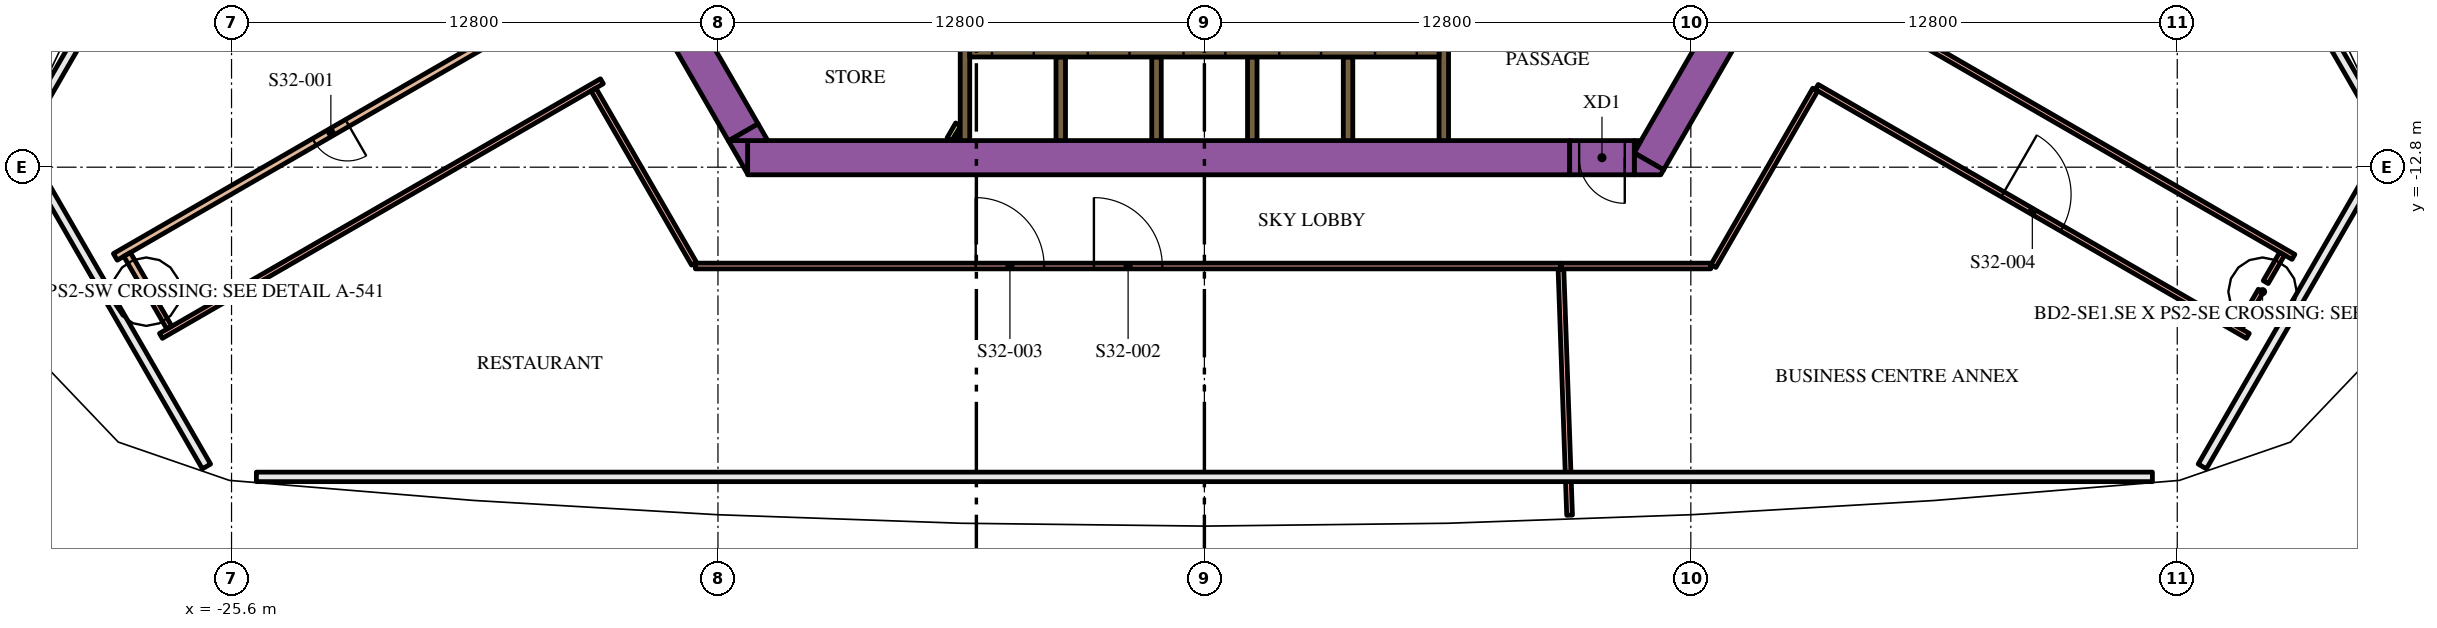
"""IFC4 building model, lengths in metres.
Left out: names, types, materials, properties, quantities, classifications, styles, units other than length and angle.
Written with IfcOpenShell. Run it as: python <this file> out.ifc"""

import sys

from ifc_helpers import new_model, si_unit, direction, frame, frame_2d, origin, place, context, subcontext, project, spatial, polyline, rectangle, outline, extrude, element, fill, save


model = new_model("IFC4")
c1 = context("Model", 3, precision=1e-05, world=origin(), true_north=direction((0.0, 1.0)))
c2 = subcontext(c1, "Body", "Model", "MODEL_VIEW")
j1 = project(units=[si_unit("LENGTHUNIT", "METRE"), si_unit("PLANEANGLEUNIT", "RADIAN")], contexts=[c1])
p1 = place(None, origin())
s1 = spatial("IfcSite", under=j1, at=p1, CompositionType="ELEMENT")
p2 = place(p1, origin())
s2 = spatial("IfcBuilding", under=s1, at=p2, CompositionType="ELEMENT")
p3 = place(p2, frame((0.0, 0.0, 134.4)))
s3 = spatial("IfcBuildingStorey", under=s2, at=p3, CompositionType="ELEMENT", Elevation=134.4)
p4 = place(p3, frame((11.695, -12.644, 0.0), z_axis=(0.0, 0.0, 1.0), x_axis=(0.500010229568, 0.86601949766, 0.0)))
e1 = element("IfcWall", 1, at=p4, inside=s3, PredefinedType="SOLIDWALL", context=c2, shape_type="SweptSolid", body=[
    extrude(rectangle(XDim=9.326, YDim=0.9, at=frame_2d((4.663, 0.0))), origin(), (0.0, 0.0, 1.0), 7.2),
])
p5 = place(p3, origin())
e2 = element("IfcWall", 2, at=p5, inside=s3, PredefinedType="SOLIDWALL", context=c2, shape_type="SweptSolid", body=[
    extrude(outline(polyline([(12.009, -13.0), (11.312, -13.0), (11.312, -12.425), (12.083, -12.871), (12.009, -13.0)])), origin(), (0.0, 0.0, 1.0), 7.2),
])
e3 = element("IfcWall", 3, at=p5, inside=s3, PredefinedType="SOLIDWALL", context=c2, shape_type="SweptSolid", body=[
    extrude(outline(polyline([(11.489, -12.1), (11.312, -12.407), (11.312, -12.1), (11.489, -12.1)])), origin(), (0.0, 0.0, 1.0), 7.2),
])
p6 = place(p3, frame((-12.019, -12.55, 0.0), z_axis=(0.0, 0.0, 1.0), x_axis=(1.0, 0.0, 0.0)))
e4 = element("IfcWall", 4, at=p6, inside=s3, PredefinedType="SOLIDWALL", context=c2, shape_type="SweptSolid", body=[
    extrude(rectangle(XDim=21.63, YDim=0.9, at=frame_2d((10.815, 0.0))), origin(), (0.0, 0.0, 1.0), 7.2),
])
e5 = element("IfcWall", 5, at=p5, inside=s3, PredefinedType="SOLIDWALL", context=c2, shape_type="SweptSolid", body=[
    extrude(outline(polyline([(-12.529, -12.1), (-12.021, -12.1), (-12.021, -12.98), (-12.529, -12.1)])), origin(), (0.0, 0.0, 1.0), 7.2),
])
p7 = place(p3, frame((-12.134, -11.883, 0.0), z_axis=(0.0, 0.0, 1.0), x_axis=(-0.500005339912, 0.866022320763, 0.0)))
e6 = element("IfcWall", 6, at=p7, inside=s3, PredefinedType="SOLIDWALL", context=c2, shape_type="SweptSolid", body=[
    extrude(rectangle(XDim=9.488, YDim=0.9, at=frame_2d((4.744, 0.0))), origin(), (0.0, 0.0, 1.0), 7.2),
])
e7 = element("IfcWall", 7, at=p5, inside=s3, PredefinedType="SOLIDWALL", context=c2, shape_type="SweptSolid", body=[
    extrude(outline(polyline([(-11.489, -12.1), (-12.505, -12.1), (-11.743, -11.66), (-11.489, -12.1)])), origin(), (0.0, 0.0, 1.0), 7.2),
])
p8 = place(p3, frame((-3.78, -12.1, 0.0), z_axis=(0.0, 0.0, 1.0), x_axis=(0.0, 1.0, 0.0)))
e8 = element("IfcWall", 8, at=p8, inside=s3, PredefinedType="SOLIDWALL", context=c2, shape_type="SweptSolid", body=[
    extrude(rectangle(XDim=2.2, YDim=0.25, at=frame_2d((1.1, 0.0))), origin(), (0.0, 0.0, 1.0), 7.2),
])
p9 = place(p3, frame((-6.3, -12.1, 0.0), z_axis=(0.0, 0.0, 1.0), x_axis=(0.0, 1.0, 0.0)))
e9 = element("IfcWall", 9, at=p9, inside=s3, PredefinedType="SOLIDWALL", context=c2, shape_type="SweptSolid", body=[
    extrude(rectangle(XDim=3.146, YDim=0.25, at=frame_2d((1.573, 0.0))), origin(), (0.0, 0.0, 1.0), 7.2),
])
p10 = place(p3, frame((6.3, -8.67, 0.0), z_axis=(0.0, 0.0, 1.0), x_axis=(0.0, -1.0, 0.0)))
e10 = element("IfcWall", 10, at=p10, inside=s3, PredefinedType="SOLIDWALL", context=c2, shape_type="SweptSolid", body=[
    extrude(rectangle(XDim=3.43, YDim=0.25, at=frame_2d((1.715, 0.0))), origin(), (0.0, 0.0, 1.0), 7.2),
])
for number, where, z_axis, x_axis in (
    (11, (3.78, -12.1, 0.0), (0.0, 0.0, 1.0), (0.0, 1.0, 0.0)),
    (12, (1.26, -12.1, 0.0), (0.0, 0.0, 1.0), (0.0, 1.0, 0.0)),
    (13, (-1.26, -12.1, 0.0), (0.0, 0.0, 1.0), (0.0, 1.0, 0.0)),
):
    element("IfcWall", number, at=place(p3, frame(where, z_axis=z_axis, x_axis=x_axis)), inside=s3, PredefinedType="SOLIDWALL", context=c2, shape_type="SweptSolid", body=[
        extrude(rectangle(XDim=2.2, YDim=0.25, at=frame_2d((1.1, 0.0))), origin(), (0.0, 0.0, 1.0), 7.2),
    ])
p11 = place(p3, frame((-6.708, -12.068, 0.0), z_axis=(0.0, 0.0, 1.0), x_axis=(0.500000789788, 0.8660249478, 0.0)))
e14 = element("IfcWall", 14, at=p11, inside=s3, PredefinedType="PARTITIONING", context=c2, shape_type="SweptSolid", body=[
    extrude(rectangle(XDim=0.456, YDim=0.15, at=frame_2d((0.228, 0.0))), origin(), (0.0, 0.0, 1.0), 6.15),
])
p12 = place(p3, frame((-6.534, -12.068, 0.0), z_axis=(0.0, 0.0, 1.0), x_axis=(0.500240224089, 0.865886665912, 0.0)))
e15 = element("IfcWall", 15, at=p12, inside=s3, PredefinedType="PARTITIONING", context=c2, shape_type="SweptSolid", body=[
    extrude(rectangle(XDim=0.109, YDim=0.15, at=frame_2d((0.054, 0.0))), origin(), (0.0, 0.0, 1.0), 6.15),
])
p13 = place(p3, frame((-6.175, -9.775, 0.0), z_axis=(0.0, 0.0, 1.0), x_axis=(1.0, 0.0, 0.0)))
e16 = element("IfcWall", 16, at=p13, inside=s3, PredefinedType="SOLIDWALL", context=c2, shape_type="SweptSolid", body=[
    extrude(rectangle(XDim=12.35, YDim=0.25, at=frame_2d((6.175, 0.0))), origin(), (0.0, 0.0, 1.0), 7.2),
])
p14 = place(p13, frame((0.585, 0.0, 0.0)))
e17 = element("IfcOpeningElement", 17, at=p14, cuts=e16, PredefinedType="OPENING", context=c2, shape_type="SweptSolid", body=[
    extrude(rectangle(XDim=1.1, YDim=2.1, at=frame_2d((0.55, 1.05))), frame((0.0, 0.135, 0.0), z_axis=(0.0, -1.0, 0.0), x_axis=(1.0, 0.0, 0.0)), (0.0, 0.0, 1.0), 0.27),
])
p15 = place(p13, frame((3.105, 0.0, 0.0)))
e18 = element("IfcOpeningElement", 18, at=p15, cuts=e16, PredefinedType="OPENING", context=c2, shape_type="SweptSolid", body=[
    extrude(rectangle(XDim=1.1, YDim=2.1, at=frame_2d((0.55, 1.05))), frame((0.0, 0.135, 0.0), z_axis=(0.0, -1.0, 0.0), x_axis=(1.0, 0.0, 0.0)), (0.0, 0.0, 1.0), 0.27),
])
p16 = place(p13, frame((5.625, 0.0, 0.0)))
e19 = element("IfcOpeningElement", 19, at=p16, cuts=e16, PredefinedType="OPENING", context=c2, shape_type="SweptSolid", body=[
    extrude(rectangle(XDim=1.1, YDim=2.1, at=frame_2d((0.55, 1.05))), frame((0.0, 0.135, 0.0), z_axis=(0.0, -1.0, 0.0), x_axis=(1.0, 0.0, 0.0)), (0.0, 0.0, 1.0), 0.27),
])
p17 = place(p13, frame((8.145, 0.0, 0.0)))
e20 = element("IfcOpeningElement", 20, at=p17, cuts=e16, PredefinedType="OPENING", context=c2, shape_type="SweptSolid", body=[
    extrude(rectangle(XDim=1.1, YDim=2.1, at=frame_2d((0.55, 1.05))), frame((0.0, 0.135, 0.0), z_axis=(0.0, -1.0, 0.0), x_axis=(1.0, 0.0, 0.0)), (0.0, 0.0, 1.0), 0.27),
])
p18 = place(p13, frame((10.665, 0.0, 0.0)))
e21 = element("IfcOpeningElement", 21, at=p18, cuts=e16, PredefinedType="OPENING", context=c2, shape_type="SweptSolid", body=[
    extrude(rectangle(XDim=1.1, YDim=2.1, at=frame_2d((0.55, 1.05))), frame((0.0, 0.135, 0.0), z_axis=(0.0, -1.0, 0.0), x_axis=(1.0, 0.0, 0.0)), (0.0, 0.0, 1.0), 0.27),
])
p19 = place(p3, frame((11.312, -12.55, 0.0), z_axis=(0.0, 0.0, 1.0), x_axis=(-1.0, 0.0, 0.0)))
e22 = element("IfcWall", 22, at=p19, inside=s3, PredefinedType="SOLIDWALL", context=c2, shape_type="SweptSolid", body=[
    extrude(rectangle(XDim=1.7, YDim=0.9, at=frame_2d((0.85, 0.0))), origin(), (0.0, 0.0, 1.0), 7.2),
])
p20 = place(p19, frame((0.25, 0.0, 0.0)))
e23 = element("IfcOpeningElement", 23, at=p20, cuts=e22, PredefinedType="OPENING", context=c2, shape_type="SweptSolid", body=[
    extrude(rectangle(XDim=1.2, YDim=2.1, at=frame_2d((0.6, 1.05))), frame((0.0, 0.46, 0.0), z_axis=(0.0, -1.0, 0.0), x_axis=(1.0, 0.0, 0.0)), (0.0, 0.0, 1.0), 0.92),
])
p21 = place(p3, frame((-13.395, -15.4, 0.0), z_axis=(0.0, 0.0, 1.0), x_axis=(1.0, 0.0, 0.0)))
e24 = element("IfcWall", 24, at=p21, inside=s3, PredefinedType="PARTITIONING", context=c2, shape_type="SweptSolid", body=[
    extrude(rectangle(XDim=22.774, YDim=0.15, at=frame_2d((11.387, 0.0))), origin(), (0.0, 0.0, 1.0), 6.15),
])
p22 = place(p21, frame((10.487, 0.0, 0.0)))
e25 = element("IfcOpeningElement", 25, at=p22, cuts=e24, PredefinedType="OPENING", context=c2, shape_type="SweptSolid", body=[
    extrude(rectangle(XDim=1.8, YDim=2.1, at=frame_2d((0.9, 1.05))), frame((0.0, 0.085, 0.0), z_axis=(0.0, -1.0, 0.0), x_axis=(1.0, 0.0, 0.0)), (0.0, 0.0, 1.0), 0.17),
])
p23 = place(p21, frame((7.377, 0.0, 0.0)))
e26 = element("IfcOpeningElement", 26, at=p23, cuts=e24, PredefinedType="OPENING", context=c2, shape_type="SweptSolid", body=[
    extrude(rectangle(XDim=1.8, YDim=2.1, at=frame_2d((0.9, 1.05))), frame((0.0, 0.085, 0.0), z_axis=(0.0, -1.0, 0.0), x_axis=(1.0, 0.0, 0.0)), (0.0, 0.0, 1.0), 0.17),
])
p24 = place(p3, frame((-17.314, -8.611, 0.0), z_axis=(0.0, 0.0, 1.0), x_axis=(-0.866025427251, -0.499999959354, 0.0)))
e27 = element("IfcWall", 27, at=p24, inside=s3, PredefinedType="PARTITIONING", context=c2, shape_type="SweptSolid", body=[
    extrude(rectangle(XDim=13.099, YDim=0.2, at=frame_2d((6.549, 0.0))), origin(), (0.0, 0.0, 1.0), 6.15),
])
p25 = place(p24, frame((6.049, 0.0, 0.0)))
e28 = element("IfcOpeningElement", 28, at=p25, cuts=e27, PredefinedType="OPENING", context=c2, shape_type="SweptSolid", body=[
    extrude(rectangle(XDim=1.0, YDim=2.1, at=frame_2d((0.5, 1.05))), frame((0.0, 0.11, 0.0), z_axis=(0.0, -1.0, 0.0), x_axis=(1.0, 0.0, 0.0)), (0.0, 0.0, 1.0), 0.22),
])
p26 = place(p3, frame((-15.854, -10.539, 0.0), z_axis=(0.0, 0.0, 1.0), x_axis=(-0.866027799164, -0.499995851058, 0.0)))
e29 = element("IfcWall", 29, at=p26, inside=s3, PredefinedType="PARTITIONING", context=c2, shape_type="SweptSolid", body=[
    extrude(rectangle(XDim=13.398, YDim=0.15, at=frame_2d((6.699, 0.0))), origin(), (0.0, 0.0, 1.0), 6.15),
])
p27 = place(p3, frame((16.114, -10.689, 0.0), z_axis=(0.0, 0.0, 1.0), x_axis=(0.866025427251, -0.499999959354, 0.0)))
e30 = element("IfcWall", 30, at=p27, inside=s3, PredefinedType="PARTITIONING", context=c2, shape_type="SweptSolid", body=[
    extrude(rectangle(XDim=13.099, YDim=0.15, at=frame_2d((6.549, 0.0))), origin(), (0.0, 0.0, 1.0), 6.15),
])
p28 = place(p27, frame((5.649, 0.0, 0.0)))
e31 = element("IfcOpeningElement", 31, at=p28, cuts=e30, PredefinedType="OPENING", context=c2, shape_type="SweptSolid", body=[
    extrude(rectangle(XDim=1.8, YDim=2.1, at=frame_2d((0.9, 1.05))), frame((0.0, 0.085, 0.0), z_axis=(0.0, -1.0, 0.0), x_axis=(1.0, 0.0, 0.0)), (0.0, 0.0, 1.0), 0.17),
])
p29 = place(p3, frame((17.054, -8.461, 0.0), z_axis=(0.0, 0.0, 1.0), x_axis=(0.866019909064, -0.500009517014, 0.0)))
e32 = element("IfcWall", 32, at=p29, inside=s3, PredefinedType="PARTITIONING", context=c2, shape_type="SweptSolid", body=[
    extrude(rectangle(XDim=13.399, YDim=0.15, at=frame_2d((6.699, 0.0))), origin(), (0.0, 0.0, 1.0), 6.15),
])
p30 = place(p3, frame((9.382, -15.48, 0.0), z_axis=(0.0, 0.0, 1.0), x_axis=(0.035074721938, -0.999384692639, 0.0)))
e33 = element("IfcWall", 33, at=p30, inside=s3, PredefinedType="PARTITIONING", context=c2, shape_type="SweptSolid", body=[
    extrude(rectangle(XDim=6.48, YDim=0.15, at=frame_2d((3.24, 0.0))), origin(), (0.0, 0.0, 1.0), 6.15),
])
p31 = place(p3, frame((-13.429, -15.339, 0.0), z_axis=(0.0, 0.0, 1.0), x_axis=(-0.500006123685, 0.866021868245, 0.0)))
e34 = element("IfcWall", 34, at=p31, inside=s3, PredefinedType="PARTITIONING", context=c2, shape_type="SweptSolid", body=[
    extrude(rectangle(XDim=5.29, YDim=0.15, at=frame_2d((2.645, 0.0))), origin(), (0.0, 0.0, 1.0), 6.15),
])
p32 = place(p3, frame((16.074, -10.759, 0.0), z_axis=(0.0, 0.0, 1.0), x_axis=(-0.499999796116, -0.866025521497, 0.0)))
e35 = element("IfcWall", 35, at=p32, inside=s3, PredefinedType="PARTITIONING", context=c2, shape_type="SweptSolid", body=[
    extrude(rectangle(XDim=5.359, YDim=0.15, at=frame_2d((2.68, 0.0))), origin(), (0.0, 0.0, 1.0), 6.15),
])
p33 = place(p3, frame((13.324, -15.4, 0.0), z_axis=(0.0, 0.0, 1.0), x_axis=(-1.0, 0.0, 0.0)))
e36 = element("IfcWall", 36, at=p33, inside=s3, PredefinedType="PARTITIONING", context=c2, shape_type="SweptSolid", body=[
    extrude(rectangle(XDim=3.935, YDim=0.15, at=frame_2d((1.968, 0.0))), origin(), (0.0, 0.0, 1.0), 6.15),
])
p34 = place(p3, frame((-27.798, -16.05, 0.0), z_axis=(0.0, 0.0, 1.0), x_axis=(-0.499933745558, 0.866063652425, 0.0)))
e37 = element("IfcWall", 37, at=p34, inside=s3, PredefinedType="PARTITIONING", context=c2, shape_type="SweptSolid", body=[
    extrude(rectangle(XDim=1.1, YDim=0.2, at=frame_2d((0.55, 0.0))), origin(), (0.0, 0.0, 1.0), 6.15),
])
p35 = place(p3, frame((27.798, -16.049, 0.0), z_axis=(0.0, 0.0, 1.0), x_axis=(-0.499936258447, -0.86606220186, 0.0)))
e38 = element("IfcWall", 38, at=p35, inside=s3, PredefinedType="PARTITIONING", context=c2, shape_type="SweptSolid", body=[
    extrude(rectangle(XDim=1.12, YDim=0.15, at=frame_2d((0.56, 0.0))), origin(), (0.0, 0.0, 1.0), 6.15),
])
p36 = place(p3, frame((-27.238, -17.019, 0.0), z_axis=(0.0, 0.0, 1.0), x_axis=(-0.499995378973, 0.866028071719, 0.0)))
e39 = element("IfcWall", 39, at=p36, inside=s3, PredefinedType="PARTITIONING", context=c2, shape_type="SweptSolid", body=[
    extrude(rectangle(XDim=1.11, YDim=0.15, at=frame_2d((0.555, 0.0))), origin(), (0.0, 0.0, 1.0), 6.15),
])
p37 = place(p3, frame((28.358, -15.079, 0.0), z_axis=(0.0, 0.0, 1.0), x_axis=(-0.500017393812, -0.86601536123, 0.0)))
e40 = element("IfcWall", 40, at=p37, inside=s3, PredefinedType="PARTITIONING", context=c2, shape_type="SweptSolid", body=[
    extrude(rectangle(XDim=0.86, YDim=0.15, at=frame_2d((0.43, 0.0))), origin(), (0.0, 0.0, 1.0), 6.15),
])
p38 = place(p14, origin())
e41 = element("IfcDoor", 41, at=p38, inside=s3, OperationType="DOUBLE_DOOR_SLIDING", PredefinedType="DOOR", context=c2, shape_type="SweptSolid", body=[
    extrude(rectangle(XDim=1.1, YDim=2.1, at=frame_2d((0.55, 1.05))), frame((0.0, 0.025, 0.0), z_axis=(0.0, -1.0, 0.0), x_axis=(1.0, 0.0, 0.0)), (0.0, 0.0, 1.0), 0.05),
])
fill(e17, e41)
p39 = place(p15, origin())
e42 = element("IfcDoor", 42, at=p39, inside=s3, OperationType="DOUBLE_DOOR_SLIDING", PredefinedType="DOOR", context=c2, shape_type="SweptSolid", body=[
    extrude(rectangle(XDim=1.1, YDim=2.1, at=frame_2d((0.55, 1.05))), frame((0.0, 0.025, 0.0), z_axis=(0.0, -1.0, 0.0), x_axis=(1.0, 0.0, 0.0)), (0.0, 0.0, 1.0), 0.05),
])
fill(e18, e42)
p40 = place(p16, origin())
e43 = element("IfcDoor", 43, at=p40, inside=s3, OperationType="DOUBLE_DOOR_SLIDING", PredefinedType="DOOR", context=c2, shape_type="SweptSolid", body=[
    extrude(rectangle(XDim=1.1, YDim=2.1, at=frame_2d((0.55, 1.05))), frame((0.0, 0.025, 0.0), z_axis=(0.0, -1.0, 0.0), x_axis=(1.0, 0.0, 0.0)), (0.0, 0.0, 1.0), 0.05),
])
fill(e19, e43)
p41 = place(p17, origin())
e44 = element("IfcDoor", 44, at=p41, inside=s3, OperationType="DOUBLE_DOOR_SLIDING", PredefinedType="DOOR", context=c2, shape_type="SweptSolid", body=[
    extrude(rectangle(XDim=1.1, YDim=2.1, at=frame_2d((0.55, 1.05))), frame((0.0, 0.025, 0.0), z_axis=(0.0, -1.0, 0.0), x_axis=(1.0, 0.0, 0.0)), (0.0, 0.0, 1.0), 0.05),
])
fill(e20, e44)
p42 = place(p18, origin())
e45 = element("IfcDoor", 45, at=p42, inside=s3, OperationType="DOUBLE_DOOR_SLIDING", PredefinedType="DOOR", context=c2, shape_type="SweptSolid", body=[
    extrude(rectangle(XDim=1.1, YDim=2.1, at=frame_2d((0.55, 1.05))), frame((0.0, 0.025, 0.0), z_axis=(0.0, -1.0, 0.0), x_axis=(1.0, 0.0, 0.0)), (0.0, 0.0, 1.0), 0.05),
])
fill(e21, e45)
p43 = place(p20, origin())
e46 = element("IfcDoor", 46, at=p43, inside=s3, OperationType="SINGLE_SWING_LEFT", PredefinedType="DOOR", context=c2, shape_type="SweptSolid", body=[
    extrude(rectangle(XDim=1.2, YDim=2.1, at=frame_2d((0.6, 1.05))), frame((0.0, 0.025, 0.0), z_axis=(0.0, -1.0, 0.0), x_axis=(1.0, 0.0, 0.0)), (0.0, 0.0, 1.0), 0.05),
])
fill(e23, e46)
p44 = place(p25, origin())
e47 = element("IfcDoor", 47, at=p44, inside=s3, OperationType="SINGLE_SWING_RIGHT", PredefinedType="DOOR", context=c2, shape_type="SweptSolid", body=[
    extrude(rectangle(XDim=1.0, YDim=2.1, at=frame_2d((0.5, 1.05))), frame((0.0, 0.025, 0.0), z_axis=(0.0, -1.0, 0.0), x_axis=(1.0, 0.0, 0.0)), (0.0, 0.0, 1.0), 0.05),
])
fill(e28, e47)
p45 = place(p22, origin())
e48 = element("IfcDoor", 48, at=p45, inside=s3, OperationType="DOUBLE_DOOR_SINGLE_SWING", PredefinedType="DOOR", context=c2, shape_type="SweptSolid", body=[
    extrude(rectangle(XDim=1.8, YDim=2.1, at=frame_2d((0.9, 1.05))), frame((0.0, 0.025, 0.0), z_axis=(0.0, -1.0, 0.0), x_axis=(1.0, 0.0, 0.0)), (0.0, 0.0, 1.0), 0.05),
])
fill(e25, e48)
p46 = place(p23, origin())
e49 = element("IfcDoor", 49, at=p46, inside=s3, OperationType="DOUBLE_DOOR_SINGLE_SWING", PredefinedType="DOOR", context=c2, shape_type="SweptSolid", body=[
    extrude(rectangle(XDim=1.8, YDim=2.1, at=frame_2d((0.9, 1.05))), frame((0.0, 0.025, 0.0), z_axis=(0.0, -1.0, 0.0), x_axis=(1.0, 0.0, 0.0)), (0.0, 0.0, 1.0), 0.05),
])
fill(e26, e49)
p47 = place(p28, origin())
e50 = element("IfcDoor", 50, at=p47, inside=s3, OperationType="DOUBLE_DOOR_SINGLE_SWING", PredefinedType="DOOR", context=c2, shape_type="SweptSolid", body=[
    extrude(rectangle(XDim=1.8, YDim=2.1, at=frame_2d((0.9, 1.05))), frame((0.0, 0.025, 0.0), z_axis=(0.0, -1.0, 0.0), x_axis=(1.0, 0.0, 0.0)), (0.0, 0.0, 1.0), 0.05),
])
fill(e31, e50)
save(model, sys.argv[1])
